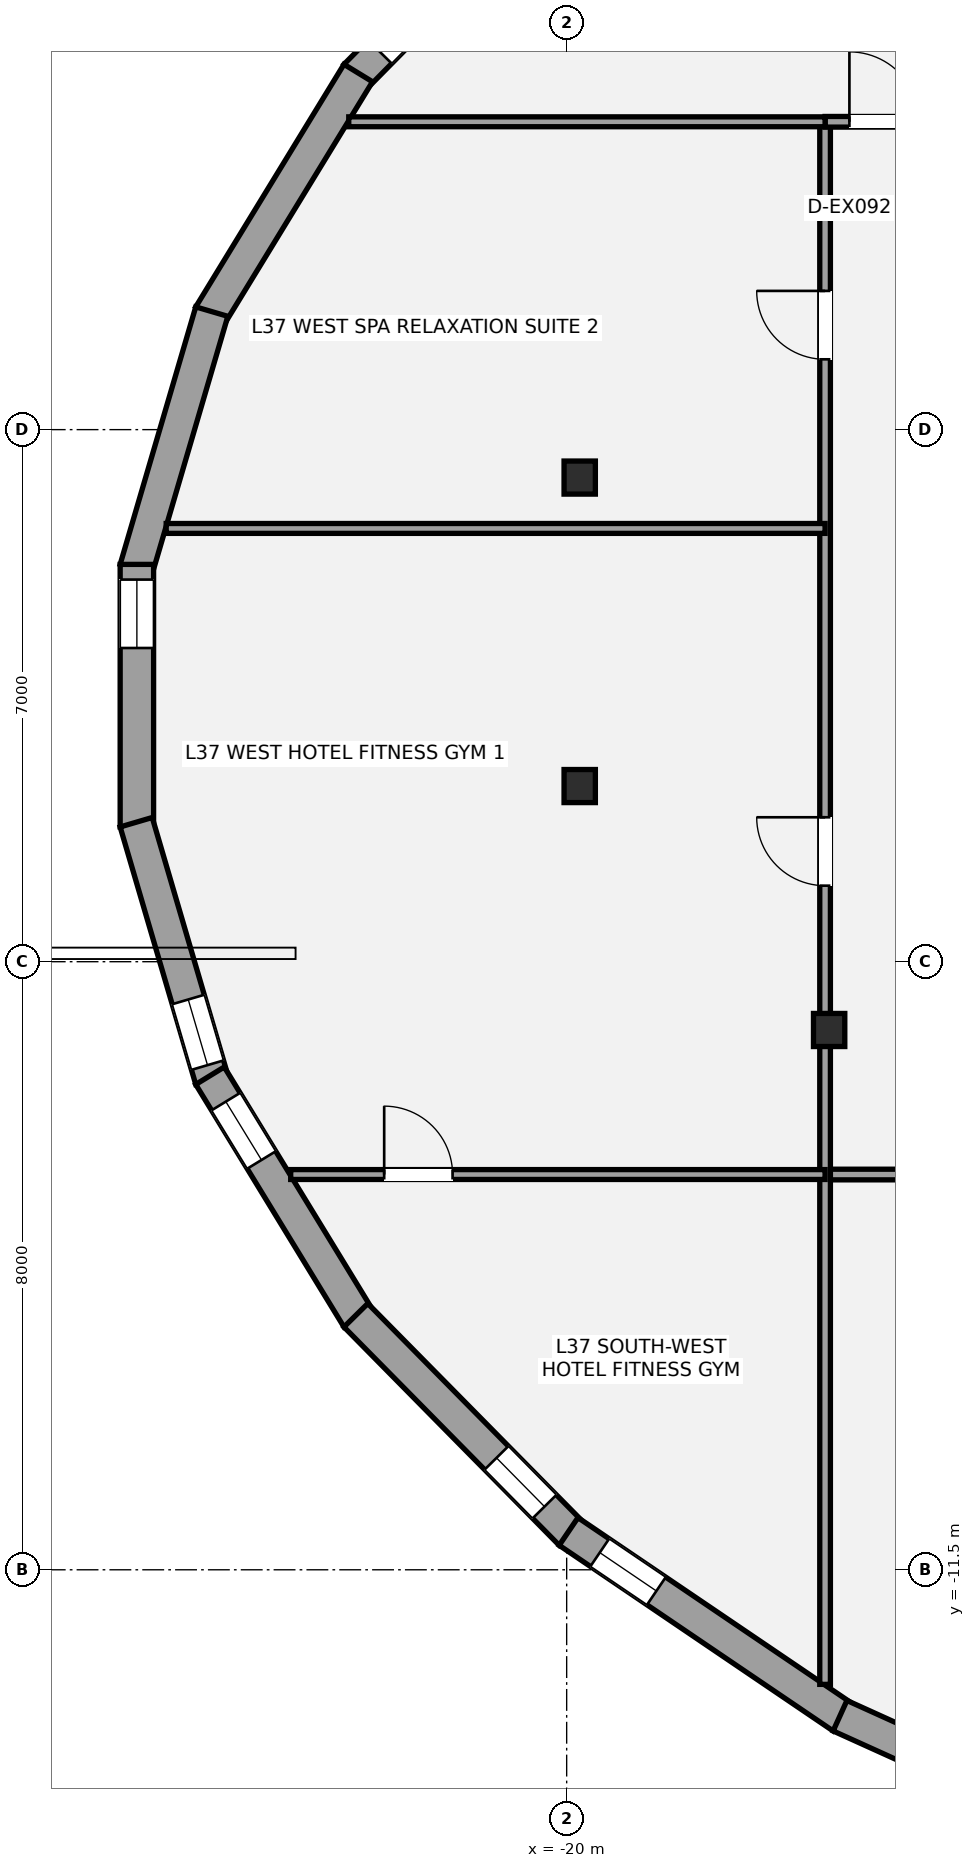
"""IFC4 building model, lengths in metres.
Left out: names, types, materials, properties, quantities, classifications, styles, units other than length and angle.
Written with IfcOpenShell. Run it as: python <this file> out.ifc"""

import sys

from ifc_helpers import new_model, si_unit, direction, frame, frame_2d, origin, origin_2d, place, context, subcontext, project, spatial, rectangle, i_section, extrude, element, fill, save


model = new_model("IFC4")
c1 = context("Model", 3, precision=1e-05, world=origin(), true_north=direction((0.0, 1.0)))
c2 = subcontext(c1, "Body", "Model", "MODEL_VIEW")
j1 = project(units=[si_unit("LENGTHUNIT", "METRE"), si_unit("PLANEANGLEUNIT", "RADIAN")], contexts=[c1])
p1 = place(None, origin())
s1 = spatial("IfcSite", under=j1, at=p1, CompositionType="ELEMENT")
p2 = place(p1, origin())
s2 = spatial("IfcBuilding", under=s1, at=p2, CompositionType="ELEMENT")
p3 = place(p2, frame((0.0, 0.0, 139.6)))
s3 = spatial("IfcBuildingStorey", under=s2, at=p3, CompositionType="ELEMENT", Elevation=139.6)
for number, where, z_axis, x_axis in (
    (1, (-19.828, 2.869, 0.0), (0.0, 0.0, 1.0), (1.0, 0.0, 0.0)),
    (2, (-19.828, -1.189, 0.0), (0.0, 0.0, 1.0), (1.0, 0.0, 0.0)),
    (3, (-16.547, -4.398, 0.0), (0.0, 0.0, 1.0), (1.0, 0.0, 0.0)),
):
    element("IfcColumn", number, at=place(p3, frame(where, z_axis=z_axis, x_axis=x_axis)), inside=s3, PredefinedType="COLUMN", context=c2, shape_type="SweptSolid", body=[
        extrude(i_section(OverallWidth=0.412, OverallDepth=0.435, WebThickness=0.036, FlangeThickness=0.057, at=origin_2d()), origin(), (0.0, 0.0, 1.0), 4.2),
    ])
p4 = place(p3, frame((-22.773, 8.152, 0.0), z_axis=(0.0, 0.0, 1.0), x_axis=(0.702094935552, 0.712083352897, 0.0)))
e4 = element("IfcWall", 4, at=p4, inside=s3, PredefinedType="STANDARD", context=c2, shape_type="SweptSolid", body=[
    extrude(rectangle(XDim=4.033, YDim=0.44, at=frame_2d((2.017, 0.0))), origin(), (0.0, 0.0, 1.0), 3.238),
])
p5 = place(p4, frame((0.448, 0.0, 0.58)))
e5 = element("IfcOpeningElement", 5, at=p5, cuts=e4, PredefinedType="OPENING", context=c2, shape_type="SweptSolid", body=[
    extrude(rectangle(XDim=0.9, YDim=1.35, at=frame_2d((0.45, 0.675))), frame((0.0, 0.23, 0.0), z_axis=(0.0, -1.0, 0.0), x_axis=(1.0, 0.0, 0.0)), (0.0, 0.0, 1.0), 0.46),
])
p6 = place(p3, frame((-24.693, 5.0, 0.0), z_axis=(0.0, 0.0, 1.0), x_axis=(0.521476412293, 0.853265698022, 0.0)))
e6 = element("IfcWall", 6, at=p6, inside=s3, PredefinedType="STANDARD", context=c2, shape_type="SweptSolid", body=[
    extrude(rectangle(XDim=3.74, YDim=0.44, at=frame_2d((1.87, 0.0))), origin(), (0.0, 0.0, 1.0), 3.238),
])
p7 = place(p3, frame((-25.664, 1.665, 0.0), z_axis=(0.0, 0.0, 1.0), x_axis=(0.28170956188, 0.959499725245, 0.0)))
e7 = element("IfcWall", 7, at=p7, inside=s3, PredefinedType="STANDARD", context=c2, shape_type="SweptSolid", body=[
    extrude(rectangle(XDim=3.531, YDim=0.44, at=frame_2d((1.765, 0.0))), origin(), (0.0, 0.0, 1.0), 3.242),
])
p8 = place(p3, frame((-25.655, -1.727, 0.0), z_axis=(0.0, 0.0, 1.0), x_axis=(0.0, 1.0, 0.0)))
e8 = element("IfcWall", 8, at=p8, inside=s3, PredefinedType="STANDARD", context=c2, shape_type="SweptSolid", body=[
    extrude(rectangle(XDim=3.454, YDim=0.44, at=frame_2d((1.727, 0.0))), origin(), (0.0, 0.0, 1.0), 3.242),
])
p9 = place(p8, frame((2.354, 0.0, 0.58)))
e9 = element("IfcOpeningElement", 9, at=p9, cuts=e8, PredefinedType="OPENING", context=c2, shape_type="SweptSolid", body=[
    extrude(rectangle(XDim=0.9, YDim=1.35, at=frame_2d((0.45, 0.675))), frame((0.0, 0.23, 0.0), z_axis=(0.0, -1.0, 0.0), x_axis=(1.0, 0.0, 0.0)), (0.0, 0.0, 1.0), 0.46),
])
p10 = place(p3, frame((-24.669, -5.053, 0.0), z_axis=(0.0, 0.0, 1.0), x_axis=(-0.28170956188, 0.959499725245, 0.0)))
e10 = element("IfcWall", 10, at=p10, inside=s3, PredefinedType="STANDARD", context=c2, shape_type="SweptSolid", body=[
    extrude(rectangle(XDim=3.531, YDim=0.44, at=frame_2d((1.765, 0.0))), origin(), (0.0, 0.0, 1.0), 3.242),
])
p11 = place(p10, frame((0.2, 0.0, 0.42)))
e11 = element("IfcOpeningElement", 11, at=p11, cuts=e10, PredefinedType="OPENING", context=c2, shape_type="SweptSolid", body=[
    extrude(rectangle(XDim=0.9, YDim=1.35, at=frame_2d((0.45, 0.675))), frame((0.0, 0.23, 0.0), z_axis=(0.0, -1.0, 0.0), x_axis=(1.0, 0.0, 0.0)), (0.0, 0.0, 1.0), 0.46),
])
p12 = place(p3, frame((-22.742, -8.191, 0.0), z_axis=(0.0, 0.0, 1.0), x_axis=(-0.521476412293, 0.853265698022, 0.0)))
e12 = element("IfcWall", 12, at=p12, inside=s3, PredefinedType="STANDARD", context=c2, shape_type="SweptSolid", body=[
    extrude(rectangle(XDim=3.74, YDim=0.44, at=frame_2d((1.87, 0.0))), origin(), (0.0, 0.0, 1.0), 3.238),
])
p13 = place(p12, frame((2.441, 0.0, 0.58)))
e13 = element("IfcOpeningElement", 13, at=p13, cuts=e12, PredefinedType="OPENING", context=c2, shape_type="SweptSolid", body=[
    extrude(rectangle(XDim=0.9, YDim=1.35, at=frame_2d((0.45, 0.675))), frame((0.0, 0.23, 0.0), z_axis=(0.0, -1.0, 0.0), x_axis=(1.0, 0.0, 0.0)), (0.0, 0.0, 1.0), 0.46),
])
p14 = place(p3, frame((-19.942, -11.023, 0.0), z_axis=(0.0, 0.0, 1.0), x_axis=(-0.702094935552, 0.712083352897, 0.0)))
e14 = element("IfcWall", 14, at=p14, inside=s3, PredefinedType="STANDARD", context=c2, shape_type="SweptSolid", body=[
    extrude(rectangle(XDim=4.033, YDim=0.44, at=frame_2d((2.017, 0.0))), origin(), (0.0, 0.0, 1.0), 3.238),
])
p15 = place(p14, frame((0.498, 0.0, 0.58)))
e15 = element("IfcOpeningElement", 15, at=p15, cuts=e14, PredefinedType="OPENING", context=c2, shape_type="SweptSolid", body=[
    extrude(rectangle(XDim=0.9, YDim=1.35, at=frame_2d((0.45, 0.675))), frame((0.0, 0.23, 0.0), z_axis=(0.0, -1.0, 0.0), x_axis=(1.0, 0.0, 0.0)), (0.0, 0.0, 1.0), 0.46),
])
p16 = place(p3, frame((-16.371, -13.438, 0.0), z_axis=(0.0, 0.0, 1.0), x_axis=(-0.827816201219, 0.56099940909, 0.0)))
e16 = element("IfcWall", 16, at=p16, inside=s3, PredefinedType="STANDARD", context=c2, shape_type="SweptSolid", body=[
    extrude(rectangle(XDim=4.354, YDim=0.44, at=frame_2d((2.177, 0.0))), origin(), (0.0, 0.0, 1.0), 3.242),
])
p17 = place(p16, frame((2.958, 0.0, 0.58)))
e17 = element("IfcOpeningElement", 17, at=p17, cuts=e16, PredefinedType="OPENING", context=c2, shape_type="SweptSolid", body=[
    extrude(rectangle(XDim=0.9, YDim=1.35, at=frame_2d((0.45, 0.675))), frame((0.0, 0.23, 0.0), z_axis=(0.0, -1.0, 0.0), x_axis=(1.0, 0.0, 0.0)), (0.0, 0.0, 1.0), 0.46),
])
p18 = place(p3, frame((-12.166, -15.339, 0.0), z_axis=(0.0, 0.0, 1.0), x_axis=(-0.910938924115, 0.412541242221, 0.0)))
e18 = element("IfcWall", 18, at=p18, inside=s3, PredefinedType="STANDARD", context=c2, shape_type="SweptSolid", body=[
    extrude(rectangle(XDim=4.652, YDim=0.44, at=frame_2d((2.326, 0.0))), origin(), (0.0, 0.0, 1.0), 3.238),
])
p19 = place(p18, frame((0.2, 0.0, 0.58)))
e19 = element("IfcOpeningElement", 19, at=p19, cuts=e18, PredefinedType="OPENING", context=c2, shape_type="SweptSolid", body=[
    extrude(rectangle(XDim=1.4, YDim=1.55, at=frame_2d((0.7, 0.775))), frame((0.0, 0.23, 0.0), z_axis=(0.0, -1.0, 0.0), x_axis=(1.0, 0.0, 0.0)), (0.0, 0.0, 1.0), 0.46),
])
p20 = place(p3, frame((-16.6, -6.3, 0.0), z_axis=(0.0, 0.0, 1.0), x_axis=(1.0, 0.0, 0.0)))
e20 = element("IfcWall", 20, at=p20, inside=s3, PredefinedType="PARTITIONING", context=c2, shape_type="SweptSolid", body=[
    extrude(rectangle(XDim=32.3, YDim=0.14, at=frame_2d((16.15, 0.0))), origin(), (0.0, 0.0, 1.0), 3.398),
])
p21 = place(p20, frame((3.35, 0.0, 0.0)))
e21 = element("IfcOpeningElement", 21, at=p21, cuts=e20, PredefinedType="OPENING", context=c2, shape_type="SweptSolid", body=[
    extrude(rectangle(XDim=0.9, YDim=2.1, at=frame_2d((0.45, 1.05))), frame((0.0, 0.08, 0.0), z_axis=(0.0, -1.0, 0.0), x_axis=(1.0, 0.0, 0.0)), (0.0, 0.0, 1.0), 0.16),
])
p22 = place(p20, frame((12.4, 0.0, 0.0)))
e22 = element("IfcOpeningElement", 22, at=p22, cuts=e20, PredefinedType="OPENING", context=c2, shape_type="SweptSolid", body=[
    extrude(rectangle(XDim=0.9, YDim=2.1, at=frame_2d((0.45, 1.05))), frame((0.0, 0.08, 0.0), z_axis=(0.0, -1.0, 0.0), x_axis=(1.0, 0.0, 0.0)), (0.0, 0.0, 1.0), 0.16),
])
p23 = place(p20, frame((21.15, 0.0, 0.0)))
e23 = element("IfcOpeningElement", 23, at=p23, cuts=e20, PredefinedType="OPENING", context=c2, shape_type="SweptSolid", body=[
    extrude(rectangle(XDim=0.9, YDim=2.1, at=frame_2d((0.45, 1.05))), frame((0.0, 0.08, 0.0), z_axis=(0.0, -1.0, 0.0), x_axis=(1.0, 0.0, 0.0)), (0.0, 0.0, 1.0), 0.16),
])
p24 = place(p20, frame((28.25, 0.0, 0.0)))
e24 = element("IfcOpeningElement", 24, at=p24, cuts=e20, PredefinedType="OPENING", context=c2, shape_type="SweptSolid", body=[
    extrude(rectangle(XDim=0.9, YDim=2.1, at=frame_2d((0.45, 1.05))), frame((0.0, 0.08, 0.0), z_axis=(0.0, -1.0, 0.0), x_axis=(1.0, 0.0, 0.0)), (0.0, 0.0, 1.0), 0.16),
])
p25 = place(p3, frame((-16.6, -13.008, 0.0), z_axis=(0.0, 0.0, 1.0), x_axis=(0.0, 1.0, 0.0)))
e25 = element("IfcWall", 25, at=p25, inside=s3, PredefinedType="PARTITIONING", context=c2, shape_type="SweptSolid", body=[
    extrude(rectangle(XDim=20.558, YDim=0.14, at=frame_2d((10.279, 0.0))), origin(), (0.0, 0.0, 1.0), 3.398),
])
p26 = place(p25, frame((10.508, 0.0, 0.0)))
e26 = element("IfcOpeningElement", 26, at=p26, cuts=e25, PredefinedType="OPENING", context=c2, shape_type="SweptSolid", body=[
    extrude(rectangle(XDim=0.9, YDim=2.1, at=frame_2d((0.45, 1.05))), frame((0.0, 0.08, 0.0), z_axis=(0.0, -1.0, 0.0), x_axis=(1.0, 0.0, 0.0)), (0.0, 0.0, 1.0), 0.16),
])
p27 = place(p25, frame((17.433, 0.0, 0.0)))
e27 = element("IfcOpeningElement", 27, at=p27, cuts=e25, PredefinedType="OPENING", context=c2, shape_type="SweptSolid", body=[
    extrude(rectangle(XDim=0.9, YDim=2.1, at=frame_2d((0.45, 1.05))), frame((0.0, 0.08, 0.0), z_axis=(0.0, -1.0, 0.0), x_axis=(1.0, 0.0, 0.0)), (0.0, 0.0, 1.0), 0.16),
])
p28 = place(p3, frame((-16.6, 7.55, 0.0), z_axis=(0.0, 0.0, 1.0), x_axis=(1.0, 0.0, 0.0)))
e28 = element("IfcWall", 28, at=p28, inside=s3, PredefinedType="PARTITIONING", context=c2, shape_type="SweptSolid", body=[
    extrude(rectangle(XDim=2.8, YDim=0.14, at=frame_2d((1.4, 0.0))), origin(), (0.0, 0.0, 1.0), 3.473),
])
p29 = place(p28, frame((0.32, 0.0, 0.0)))
e29 = element("IfcOpeningElement", 29, at=p29, cuts=e28, PredefinedType="OPENING", context=c2, shape_type="SweptSolid", body=[
    extrude(rectangle(XDim=0.92, YDim=2.15, at=frame_2d((0.46, 1.075))), frame((0.0, 0.08, 0.0), z_axis=(0.0, -1.0, 0.0), x_axis=(1.0, 0.0, 0.0)), (0.0, 0.0, 1.0), 0.16),
])
p30 = place(p3, frame((-22.867, 7.55, 0.0), z_axis=(0.0, 0.0, 1.0), x_axis=(1.0, 0.0, 0.0)))
e30 = element("IfcWall", 30, at=p30, inside=s3, PredefinedType="PARTITIONING", context=c2, shape_type="SweptSolid", body=[
    extrude(rectangle(XDim=6.267, YDim=0.13, at=frame_2d((3.133, 0.0))), origin(), (0.0, 0.0, 1.0), 3.473),
])
p31 = place(p3, frame((-23.631, -6.3, 0.0), z_axis=(0.0, 0.0, 1.0), x_axis=(1.0, 0.0, 0.0)))
e31 = element("IfcWall", 31, at=p31, inside=s3, PredefinedType="PARTITIONING", context=c2, shape_type="SweptSolid", body=[
    extrude(rectangle(XDim=7.031, YDim=0.13, at=frame_2d((3.516, 0.0))), origin(), (0.0, 0.0, 1.0), 3.473),
])
p32 = place(p31, frame((1.23, 0.0, 0.0)))
e32 = element("IfcOpeningElement", 32, at=p32, cuts=e31, PredefinedType="OPENING", context=c2, shape_type="SweptSolid", body=[
    extrude(rectangle(XDim=0.9, YDim=2.1, at=frame_2d((0.45, 1.05))), frame((0.0, 0.075, 0.0), z_axis=(0.0, -1.0, 0.0), x_axis=(1.0, 0.0, 0.0)), (0.0, 0.0, 1.0), 0.15),
])
p33 = place(p3, frame((-25.269, 2.2, 0.0), z_axis=(0.0, 0.0, 1.0), x_axis=(1.0, 0.0, 0.0)))
e33 = element("IfcWall", 33, at=p33, inside=s3, PredefinedType="PARTITIONING", context=c2, shape_type="SweptSolid", body=[
    extrude(rectangle(XDim=8.669, YDim=0.13, at=frame_2d((4.334, 0.0))), origin(), (0.0, 0.0, 1.0), 3.473),
])
p34 = place(p5, origin())
e34 = element("IfcWindow", 34, at=p34, inside=s3, PartitioningType="SINGLE_PANEL", PredefinedType="WINDOW", context=c2, shape_type="SweptSolid", body=[
    extrude(rectangle(XDim=0.9, YDim=1.35, at=frame_2d((0.45, 0.675))), frame((0.0, -0.01, 0.0), z_axis=(0.0, -1.0, 0.0), x_axis=(1.0, 0.0, 0.0)), (0.0, 0.0, 1.0), 0.06),
])
fill(e5, e34)
p35 = place(p9, origin())
e35 = element("IfcWindow", 35, at=p35, inside=s3, PartitioningType="SINGLE_PANEL", PredefinedType="WINDOW", context=c2, shape_type="SweptSolid", body=[
    extrude(rectangle(XDim=0.9, YDim=1.35, at=frame_2d((0.45, 0.675))), frame((0.0, -0.01, 0.0), z_axis=(0.0, -1.0, 0.0), x_axis=(1.0, 0.0, 0.0)), (0.0, 0.0, 1.0), 0.06),
])
fill(e9, e35)
p36 = place(p11, origin())
e36 = element("IfcWindow", 36, at=p36, inside=s3, PartitioningType="SINGLE_PANEL", PredefinedType="WINDOW", context=c2, shape_type="SweptSolid", body=[
    extrude(rectangle(XDim=0.9, YDim=1.35, at=frame_2d((0.45, 0.675))), frame((0.0, -0.01, 0.0), z_axis=(0.0, -1.0, 0.0), x_axis=(1.0, 0.0, 0.0)), (0.0, 0.0, 1.0), 0.06),
])
fill(e11, e36)
p37 = place(p13, origin())
e37 = element("IfcWindow", 37, at=p37, inside=s3, PartitioningType="SINGLE_PANEL", PredefinedType="WINDOW", context=c2, shape_type="SweptSolid", body=[
    extrude(rectangle(XDim=0.9, YDim=1.35, at=frame_2d((0.45, 0.675))), frame((0.0, -0.01, 0.0), z_axis=(0.0, -1.0, 0.0), x_axis=(1.0, 0.0, 0.0)), (0.0, 0.0, 1.0), 0.06),
])
fill(e13, e37)
p38 = place(p15, origin())
e38 = element("IfcWindow", 38, at=p38, inside=s3, PartitioningType="SINGLE_PANEL", PredefinedType="WINDOW", context=c2, shape_type="SweptSolid", body=[
    extrude(rectangle(XDim=0.9, YDim=1.35, at=frame_2d((0.45, 0.675))), frame((0.0, -0.01, 0.0), z_axis=(0.0, -1.0, 0.0), x_axis=(1.0, 0.0, 0.0)), (0.0, 0.0, 1.0), 0.06),
])
fill(e15, e38)
p39 = place(p17, origin())
e39 = element("IfcWindow", 39, at=p39, inside=s3, PartitioningType="SINGLE_PANEL", PredefinedType="WINDOW", context=c2, shape_type="SweptSolid", body=[
    extrude(rectangle(XDim=0.9, YDim=1.35, at=frame_2d((0.45, 0.675))), frame((0.0, -0.01, 0.0), z_axis=(0.0, -1.0, 0.0), x_axis=(1.0, 0.0, 0.0)), (0.0, 0.0, 1.0), 0.06),
])
fill(e17, e39)
p40 = place(p29, origin())
e40 = element("IfcDoor", 40, at=p40, inside=s3, OperationType="SINGLE_SWING_LEFT", PredefinedType="DOOR", context=c2, shape_type="SweptSolid", body=[
    extrude(rectangle(XDim=0.92, YDim=2.15, at=frame_2d((0.46, 1.075))), frame((0.0, 0.025, 0.0), z_axis=(0.0, -1.0, 0.0), x_axis=(1.0, 0.0, 0.0)), (0.0, 0.0, 1.0), 0.05),
])
fill(e29, e40)
p41 = place(p32, origin())
e41 = element("IfcDoor", 41, at=p41, inside=s3, OperationType="SINGLE_SWING_LEFT", PredefinedType="DOOR", context=c2, shape_type="SweptSolid", body=[
    extrude(rectangle(XDim=0.9, YDim=2.1, at=frame_2d((0.45, 1.05))), frame((0.0, 0.025, 0.0), z_axis=(0.0, -1.0, 0.0), x_axis=(1.0, 0.0, 0.0)), (0.0, 0.0, 1.0), 0.05),
])
fill(e32, e41)
p42 = place(p26, origin())
e42 = element("IfcDoor", 42, at=p42, inside=s3, OperationType="SINGLE_SWING_RIGHT", PredefinedType="DOOR", context=c2, shape_type="SweptSolid", body=[
    extrude(rectangle(XDim=0.9, YDim=2.1, at=frame_2d((0.45, 1.05))), frame((0.0, 0.025, 0.0), z_axis=(0.0, -1.0, 0.0), x_axis=(1.0, 0.0, 0.0)), (0.0, 0.0, 1.0), 0.05),
])
fill(e26, e42)
p43 = place(p27, origin())
e43 = element("IfcDoor", 43, at=p43, inside=s3, OperationType="SINGLE_SWING_RIGHT", PredefinedType="DOOR", context=c2, shape_type="SweptSolid", body=[
    extrude(rectangle(XDim=0.9, YDim=2.1, at=frame_2d((0.45, 1.05))), frame((0.0, 0.025, 0.0), z_axis=(0.0, -1.0, 0.0), x_axis=(1.0, 0.0, 0.0)), (0.0, 0.0, 1.0), 0.05),
])
fill(e27, e43)
save(model, sys.argv[1])
